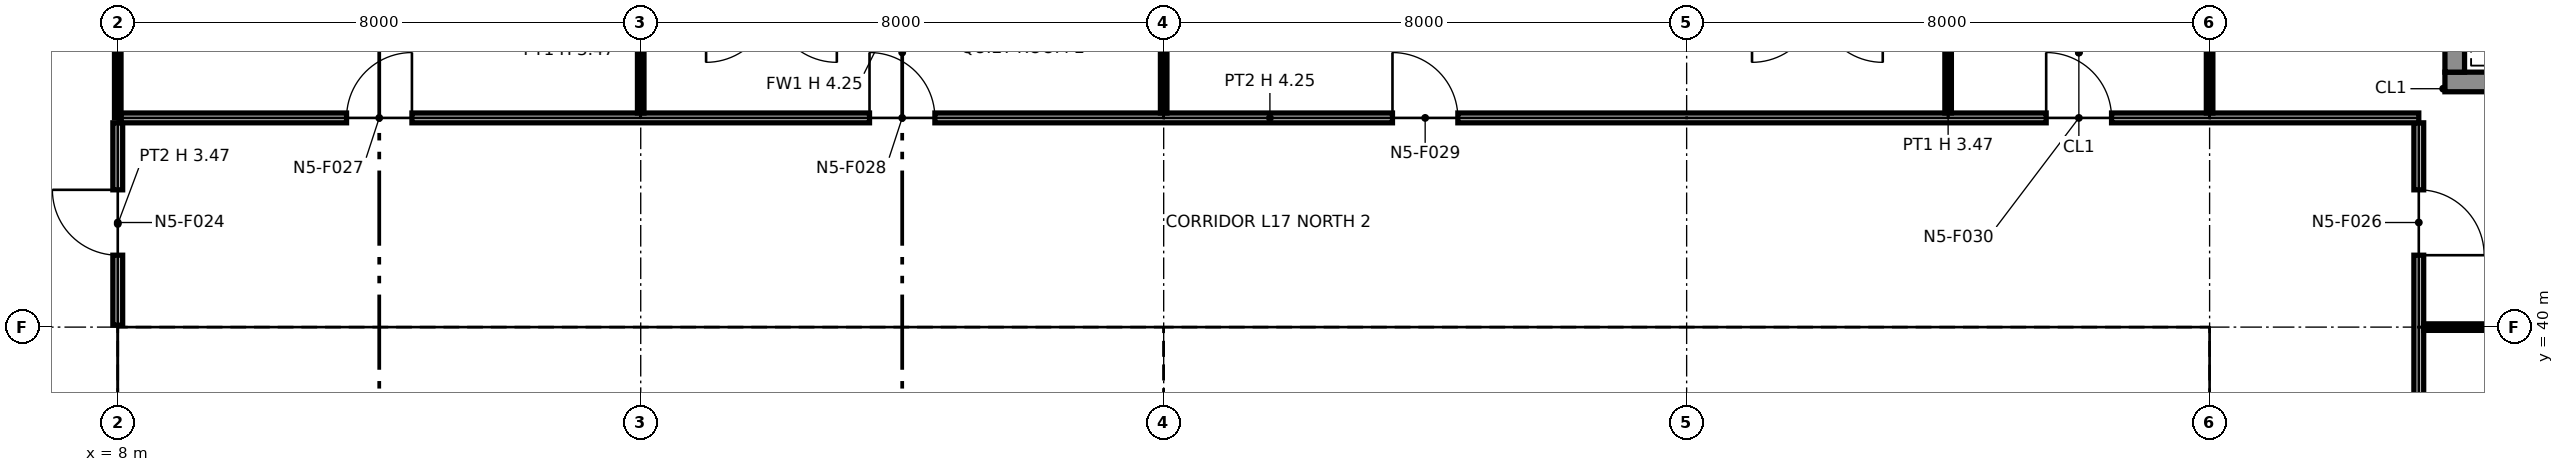
"""IFC4 building model, lengths in metres.
Left out: names, types, materials, properties, quantities, classifications, styles, units other than length and angle.
Written with IfcOpenShell. Run it as: python <this file> out.ifc"""

import sys

from ifc_helpers import new_model, si_unit, direction, frame, frame_2d, origin, origin_2d, place, context, subcontext, project, spatial, polyline, rectangle, i_section, outline, extrude, element, fill, save


model = new_model("IFC4")
c1 = context("Model", 3, precision=1e-05, world=origin(), true_north=direction((0.0, 1.0)))
c2 = subcontext(c1, "Body", "Model", "MODEL_VIEW")
j1 = project(units=[si_unit("LENGTHUNIT", "METRE"), si_unit("PLANEANGLEUNIT", "RADIAN")], contexts=[c1])
p1 = place(None, origin())
s1 = spatial("IfcSite", under=j1, at=p1, CompositionType="ELEMENT")
p2 = place(p1, origin())
s2 = spatial("IfcBuilding", under=s1, at=p2, CompositionType="ELEMENT")
p3 = place(p2, frame((0.0, 0.0, 92.0)))
s3 = spatial("IfcBuildingStorey", under=s2, at=p3, CompositionType="ELEMENT", Elevation=92.0)
for number, where, z_axis, x_axis in (
    (1, (8.0, 40.0, 0.0), (0.0, 0.0, 1.0), (1.0, 0.0, 0.0)),
    (2, (16.0, 40.0, 0.0), (0.0, 0.0, 1.0), (1.0, 0.0, 0.0)),
):
    element("IfcColumn", number, at=place(p3, frame(where, z_axis=z_axis, x_axis=x_axis)), inside=s3, PredefinedType="COLUMN", context=c2, shape_type="SweptSolid", body=[
        extrude(i_section(OverallWidth=0.394, OverallDepth=0.376, WebThickness=0.017, FlangeThickness=0.028, at=origin_2d()), origin(), (0.0, 0.0, 1.0), 4.25),
    ])
p4 = place(p3, frame((24.0, 40.0, 0.0), z_axis=(0.0, 0.0, 1.0), x_axis=(1.0, 0.0, 0.0)))
e3 = element("IfcColumn", 3, at=p4, inside=s3, PredefinedType="COLUMN", context=c2, shape_type="SweptSolid", body=[
    extrude(i_section(OverallWidth=0.399, OverallDepth=0.386, WebThickness=0.021, FlangeThickness=0.033, at=origin_2d()), origin(), (0.0, 0.0, 1.0), 4.25),
])
for number, where, z_axis, x_axis in (
    (4, (32.0, 40.0, 0.0), (0.0, 0.0, 1.0), (1.0, 0.0, 0.0)),
    (5, (40.0, 40.0, 0.0), (0.0, 0.0, 1.0), (1.0, 0.0, 0.0)),
):
    element("IfcColumn", number, at=place(p3, frame(where, z_axis=z_axis, x_axis=x_axis)), inside=s3, PredefinedType="COLUMN", context=c2, shape_type="SweptSolid", body=[
        extrude(i_section(OverallWidth=0.257, OverallDepth=0.363, WebThickness=0.013, FlangeThickness=0.022, at=origin_2d()), origin(), (0.0, 0.0, 1.0), 4.25),
    ])
p5 = place(p3, frame((45.9, 43.75, 0.0), z_axis=(0.0, 0.0, 1.0), x_axis=(-1.0, 0.0, 0.0)))
e6 = element("IfcWall", 6, at=p5, inside=s3, PredefinedType="SOLIDWALL", context=c2, shape_type="SweptSolid", body=[
    extrude(rectangle(XDim=2.3, YDim=0.3, at=frame_2d((1.15, 0.0))), origin(), (0.0, 0.0, 1.0), 4.25),
])
p6 = place(p3, frame((43.75, 43.9, 0.0), z_axis=(0.0, 0.0, 1.0), x_axis=(0.0, 1.0, 0.0)))
e7 = element("IfcWall", 7, at=p6, inside=s3, PredefinedType="SOLIDWALL", context=c2, shape_type="SweptSolid", body=[
    extrude(rectangle(XDim=1.7, YDim=0.3, at=frame_2d((0.85, 0.0))), origin(), (0.0, 0.0, 1.0), 4.25),
])
p7 = place(p3, frame((8.75, 32.85, 0.0), z_axis=(0.0, 0.0, 1.0), x_axis=(0.0, 1.0, 0.0)))
e8 = element("IfcWall", 8, at=p7, inside=s3, PredefinedType="PARTITIONING", context=c2, shape_type="SweptSolid", body=[
    extrude(outline(polyline([(0.0, 0.0), (6.3, 0.0), (6.3, 4.25), (3.231, 4.25), (3.23, 3.789), (3.07, 3.789), (3.069, 4.25), (0.0, 4.25), (0.0, 0.0)])), frame((0.0, 0.1, 0.0), z_axis=(0.0, -1.0, 0.0), x_axis=(1.0, 0.0, 0.0)), (0.0, 0.0, 1.0), 0.2),
])
p8 = place(p3, frame((8.65, 39.25, 0.0), z_axis=(0.0, 0.0, 1.0), x_axis=(1.0, 0.0, 0.0)))
e9 = element("IfcWall", 9, at=p8, inside=s3, PredefinedType="PARTITIONING", context=c2, shape_type="SweptSolid", body=[
    extrude(outline(polyline([(0.0, 0.0), (14.7, 0.0), (14.7, 4.25), (7.469, 4.25), (7.469, 3.632), (7.231, 3.632), (7.23, 4.25), (0.0, 4.25), (0.0, 0.0)])), frame((0.0, 0.1, 0.0), z_axis=(0.0, -1.0, 0.0), x_axis=(1.0, 0.0, 0.0)), (0.0, 0.0, 1.0), 0.2),
])
for number, where, z_axis, x_axis in (
    (10, (10.675, 34.95, 0.0), (0.0, 0.0, 1.0), (0.0, 1.0, 0.0)),
    (11, (12.425, 34.95, 0.0), (0.0, 0.0, 1.0), (0.0, 1.0, 0.0)),
    (12, (14.275, 34.95, 0.0), (0.0, 0.0, 1.0), (0.0, 1.0, 0.0)),
):
    element("IfcWall", number, at=place(p3, frame(where, z_axis=z_axis, x_axis=x_axis)), inside=s3, PredefinedType="PARTITIONING", context=c2, shape_type="SweptSolid", body=[
        extrude(outline(polyline([(0.0, 0.0), (4.2, 0.0), (4.2, 4.25), (1.132, 4.25), (1.131, 3.789), (0.969, 3.789), (0.969, 4.25), (0.0, 4.25), (0.0, 0.0)])), frame((0.0, 0.075, 0.0), z_axis=(0.0, -1.0, 0.0), x_axis=(1.0, 0.0, 0.0)), (0.0, 0.0, 1.0), 0.15),
    ])
p9 = place(p3, frame((16.0, 34.95, 0.0), z_axis=(0.0, 0.0, 1.0), x_axis=(0.0, 1.0, 0.0)))
e13 = element("IfcWall", 13, at=p9, inside=s3, PredefinedType="PARTITIONING", context=c2, shape_type="SweptSolid", body=[
    extrude(rectangle(XDim=4.2, YDim=0.6, at=frame_2d((2.1, 0.0))), origin(), (0.0, 0.0, 1.0), 3.632),
])
for number, where, z_axis, x_axis in (
    (14, (19.2, 32.85, 0.0), (0.0, 0.0, 1.0), (0.0, 1.0, 0.0)),
    (15, (23.25, 32.85, 0.0), (0.0, 0.0, 1.0), (0.0, 1.0, 0.0)),
):
    element("IfcWall", number, at=place(p3, frame(where, z_axis=z_axis, x_axis=x_axis)), inside=s3, PredefinedType="PARTITIONING", context=c2, shape_type="SweptSolid", body=[
        extrude(rectangle(XDim=6.3, YDim=0.2, at=frame_2d((3.15, 0.0))), origin(), (0.0, 0.0, 1.0), 4.25),
    ])
p10 = place(p3, frame((24.75, 32.85, 0.0), z_axis=(0.0, 0.0, 1.0), x_axis=(0.0, 1.0, 0.0)))
e16 = element("IfcWall", 16, at=p10, inside=s3, PredefinedType="PARTITIONING", context=c2, shape_type="SweptSolid", body=[
    extrude(outline(polyline([(0.0, 0.0), (6.3, 0.0), (6.3, 4.25), (3.231, 4.25), (3.23, 3.789), (3.07, 3.789), (3.069, 4.25), (0.0, 4.25), (0.0, 0.0)])), frame((0.0, 0.1, 0.0), z_axis=(0.0, -1.0, 0.0), x_axis=(1.0, 0.0, 0.0)), (0.0, 0.0, 1.0), 0.2),
])
p11 = place(p3, frame((24.65, 39.25, 0.0), z_axis=(0.0, 0.0, 1.0), x_axis=(1.0, 0.0, 0.0)))
e17 = element("IfcWall", 17, at=p11, inside=s3, PredefinedType="PARTITIONING", context=c2, shape_type="SweptSolid", body=[
    extrude(outline(polyline([(0.0, 0.0), (14.7, 0.0), (14.7, 4.25), (7.469, 4.25), (7.469, 3.632), (7.231, 3.632), (7.23, 4.25), (0.0, 4.25), (0.0, 0.0)])), frame((0.0, 0.1, 0.0), z_axis=(0.0, -1.0, 0.0), x_axis=(1.0, 0.0, 0.0)), (0.0, 0.0, 1.0), 0.2),
])
for number, where, z_axis, x_axis in (
    (18, (27.2, 36.4, 0.0), (0.0, 0.0, 1.0), (0.0, 1.0, 0.0)),
    (19, (29.5, 36.4, 0.0), (0.0, 0.0, 1.0), (0.0, 1.0, 0.0)),
):
    element("IfcWall", number, at=place(p3, frame(where, z_axis=z_axis, x_axis=x_axis)), inside=s3, PredefinedType="PARTITIONING", context=c2, shape_type="SweptSolid", body=[
        extrude(rectangle(XDim=2.75, YDim=0.2, at=frame_2d((1.375, 0.0))), origin(), (0.0, 0.0, 1.0), 4.25),
    ])
p12 = place(p3, frame((32.0, 32.85, 0.0), z_axis=(0.0, 0.0, 1.0), x_axis=(0.0, 1.0, 0.0)))
e20 = element("IfcWall", 20, at=p12, inside=s3, PredefinedType="PARTITIONING", context=c2, shape_type="SweptSolid", body=[
    extrude(rectangle(XDim=6.3, YDim=0.6, at=frame_2d((3.15, 0.0))), origin(), (0.0, 0.0, 1.0), 3.632),
])
for number, where, z_axis, x_axis in (
    (21, (35.6, 32.85, 0.0), (0.0, 0.0, 1.0), (0.0, 1.0, 0.0)),
    (22, (39.25, 32.85, 0.0), (0.0, 0.0, 1.0), (0.0, 1.0, 0.0)),
):
    element("IfcWall", number, at=place(p3, frame(where, z_axis=z_axis, x_axis=x_axis)), inside=s3, PredefinedType="PARTITIONING", context=c2, shape_type="SweptSolid", body=[
        extrude(rectangle(XDim=6.3, YDim=0.2, at=frame_2d((3.15, 0.0))), origin(), (0.0, 0.0, 1.0), 4.25),
    ])
p13 = place(p3, frame((43.2, 16.0, 0.0), z_axis=(0.0, 0.0, 1.0), x_axis=(0.0, 1.0, 0.0)))
e23 = element("IfcWall", 23, at=p13, inside=s3, PredefinedType="PARTITIONING", context=c2, shape_type="SweptSolid", body=[
    extrude(outline(polyline([(0.0, 0.0), (27.125, 0.0), (27.125, 4.25), (24.3, 4.25), (24.298, 3.47), (23.702, 3.47), (23.7, 4.25), (20.3, 4.25), (20.298, 3.47), (19.702, 3.47), (19.7, 4.25), (16.3, 4.25), (16.298, 3.47), (15.702, 3.47), (15.7, 4.25), (12.3, 4.25), (12.298, 3.47), (11.702, 3.47), (11.7, 4.25), (8.3, 4.25), (8.298, 3.47), (7.702, 3.47), (7.7, 4.25), (4.3, 4.25), (4.298, 3.47), (3.702, 3.47), (3.7, 4.25), (0.0, 4.25), (0.0, 0.0)])), frame((0.0, 0.075, 0.0), z_axis=(0.0, -1.0, 0.0), x_axis=(1.0, 0.0, 0.0)), (0.0, 0.0, 1.0), 0.15),
])
p14 = place(p13, frame((2.5, 0.0, 0.0), z_axis=(0.0, 0.0, 1.0), x_axis=(-1.0, 0.0, 0.0)))
e24 = element("IfcOpeningElement", 24, at=p14, cuts=e23, PredefinedType="OPENING", context=c2, shape_type="SweptSolid", body=[
    extrude(rectangle(XDim=1.0, YDim=2.1, at=frame_2d((0.5, 1.05))), frame((0.0, 0.085, 0.0), z_axis=(0.0, -1.0, 0.0), x_axis=(1.0, 0.0, 0.0)), (0.0, 0.0, 1.0), 0.17),
])
p15 = place(p13, frame((12.5, 0.0, 0.0), z_axis=(0.0, 0.0, 1.0), x_axis=(-1.0, 0.0, 0.0)))
e25 = element("IfcOpeningElement", 25, at=p15, cuts=e23, PredefinedType="OPENING", context=c2, shape_type="SweptSolid", body=[
    extrude(rectangle(XDim=1.0, YDim=2.1, at=frame_2d((0.5, 1.05))), frame((0.0, 0.085, 0.0), z_axis=(0.0, -1.0, 0.0), x_axis=(1.0, 0.0, 0.0)), (0.0, 0.0, 1.0), 0.17),
])
p16 = place(p13, frame((18.5, 0.0, 0.0), z_axis=(0.0, 0.0, 1.0), x_axis=(-1.0, 0.0, 0.0)))
e26 = element("IfcOpeningElement", 26, at=p16, cuts=e23, PredefinedType="OPENING", context=c2, shape_type="SweptSolid", body=[
    extrude(rectangle(XDim=1.0, YDim=2.1, at=frame_2d((0.5, 1.05))), frame((0.0, 0.085, 0.0), z_axis=(0.0, -1.0, 0.0), x_axis=(1.0, 0.0, 0.0)), (0.0, 0.0, 1.0), 0.17),
])
p17 = place(p13, frame((22.5, 0.0, 0.0), z_axis=(0.0, 0.0, 1.0), x_axis=(-1.0, 0.0, 0.0)))
e27 = element("IfcOpeningElement", 27, at=p17, cuts=e23, PredefinedType="OPENING", context=c2, shape_type="SweptSolid", body=[
    extrude(rectangle(XDim=1.0, YDim=2.1, at=frame_2d((0.5, 1.05))), frame((0.0, 0.085, 0.0), z_axis=(0.0, -1.0, 0.0), x_axis=(1.0, 0.0, 0.0)), (0.0, 0.0, 1.0), 0.17),
])
p18 = place(p13, frame((26.1, 0.0, 0.0), z_axis=(0.0, 0.0, 1.0), x_axis=(-1.0, 0.0, 0.0)))
e28 = element("IfcOpeningElement", 28, at=p18, cuts=e23, PredefinedType="OPENING", context=c2, shape_type="SweptSolid", body=[
    extrude(rectangle(XDim=1.0, YDim=2.1, at=frame_2d((0.5, 1.05))), frame((0.0, 0.085, 0.0), z_axis=(0.0, -1.0, 0.0), x_axis=(1.0, 0.0, 0.0)), (0.0, 0.0, 1.0), 0.17),
])
p19 = place(p3, frame((43.275, 40.0, 0.0), z_axis=(0.0, 0.0, 1.0), x_axis=(1.0, 0.0, 0.0)))
e29 = element("IfcWall", 29, at=p19, inside=s3, PredefinedType="PARTITIONING", context=c2, shape_type="SweptSolid", body=[
    extrude(rectangle(XDim=4.595, YDim=0.1, at=frame_2d((2.298, 0.0))), origin(), (0.0, 0.0, 1.0), 3.47),
])
p20 = place(p3, frame((8.0, 40.03, 0.0), z_axis=(0.0, 0.0, 1.0), x_axis=(0.0, 1.0, 0.0)))
e30 = element("IfcWall", 30, at=p20, inside=s3, PredefinedType="PARTITIONING", context=c2, shape_type="SweptSolid", body=[
    extrude(rectangle(XDim=3.095, YDim=0.15, at=frame_2d((1.547, 0.0))), origin(), (0.0, 0.0, 1.0), 3.47),
])
p21 = place(p20, frame((1.07, 0.0, 0.0)))
e31 = element("IfcOpeningElement", 31, at=p21, cuts=e30, PredefinedType="OPENING", context=c2, shape_type="SweptSolid", body=[
    extrude(rectangle(XDim=1.0, YDim=2.1, at=frame_2d((0.5, 1.05))), frame((0.0, 0.085, 0.0), z_axis=(0.0, -1.0, 0.0), x_axis=(1.0, 0.0, 0.0)), (0.0, 0.0, 1.0), 0.17),
])
p22 = place(p3, frame((8.05, 43.2, 0.0), z_axis=(0.0, 0.0, 1.0), x_axis=(1.0, 0.0, 0.0)))
e32 = element("IfcWall", 32, at=p22, inside=s3, PredefinedType="PARTITIONING", context=c2, shape_type="SweptSolid", body=[
    extrude(rectangle(XDim=35.15, YDim=0.15, at=frame_2d((17.575, 0.0))), origin(), (0.0, 0.0, 1.0), 4.25),
])
p23 = place(p22, frame((3.45, 0.0, 0.0)))
e33 = element("IfcOpeningElement", 33, at=p23, cuts=e32, PredefinedType="OPENING", context=c2, shape_type="SweptSolid", body=[
    extrude(rectangle(XDim=1.0, YDim=2.1, at=frame_2d((0.5, 1.05))), frame((0.0, 0.085, 0.0), z_axis=(0.0, -1.0, 0.0), x_axis=(1.0, 0.0, 0.0)), (0.0, 0.0, 1.0), 0.17),
])
p24 = place(p22, frame((11.45, 0.0, 0.0)))
e34 = element("IfcOpeningElement", 34, at=p24, cuts=e32, PredefinedType="OPENING", context=c2, shape_type="SweptSolid", body=[
    extrude(rectangle(XDim=1.0, YDim=2.1, at=frame_2d((0.5, 1.05))), frame((0.0, 0.085, 0.0), z_axis=(0.0, -1.0, 0.0), x_axis=(1.0, 0.0, 0.0)), (0.0, 0.0, 1.0), 0.17),
])
p25 = place(p22, frame((19.45, 0.0, 0.0)))
e35 = element("IfcOpeningElement", 35, at=p25, cuts=e32, PredefinedType="OPENING", context=c2, shape_type="SweptSolid", body=[
    extrude(rectangle(XDim=1.0, YDim=2.1, at=frame_2d((0.5, 1.05))), frame((0.0, 0.085, 0.0), z_axis=(0.0, -1.0, 0.0), x_axis=(1.0, 0.0, 0.0)), (0.0, 0.0, 1.0), 0.17),
])
p26 = place(p22, frame((29.45, 0.0, 0.0)))
e36 = element("IfcOpeningElement", 36, at=p26, cuts=e32, PredefinedType="OPENING", context=c2, shape_type="SweptSolid", body=[
    extrude(rectangle(XDim=1.0, YDim=2.1, at=frame_2d((0.5, 1.05))), frame((0.0, 0.085, 0.0), z_axis=(0.0, -1.0, 0.0), x_axis=(1.0, 0.0, 0.0)), (0.0, 0.0, 1.0), 0.17),
])
p27 = place(p3, frame((8.0, 43.2, 0.0), z_axis=(0.0, 0.0, 1.0), x_axis=(0.0, 1.0, 0.0)))
e37 = element("IfcWall", 37, at=p27, inside=s3, PredefinedType="PARTITIONING", context=c2, shape_type="SweptSolid", body=[
    extrude(rectangle(XDim=4.67, YDim=0.1, at=frame_2d((2.335, 0.0))), origin(), (0.0, 0.0, 1.0), 3.47),
])
for number, where, z_axis, x_axis in (
    (38, (16.0, 43.275, 0.0), (0.0, 0.0, 1.0), (0.0, 1.0, 0.0)),
    (39, (24.0, 43.275, 0.0), (0.0, 0.0, 1.0), (0.0, 1.0, 0.0)),
    (40, (36.0, 43.275, 0.0), (0.0, 0.0, 1.0), (0.0, 1.0, 0.0)),
    (41, (40.0, 43.275, 0.0), (0.0, 0.0, 1.0), (0.0, 1.0, 0.0)),
):
    element("IfcWall", number, at=place(p3, frame(where, z_axis=z_axis, x_axis=x_axis)), inside=s3, PredefinedType="PARTITIONING", context=c2, shape_type="SweptSolid", body=[
        extrude(rectangle(XDim=1.895, YDim=0.1, at=frame_2d((0.948, 0.0))), origin(), (0.0, 0.0, 1.0), 3.47),
    ])
p28 = place(p21, origin())
e42 = element("IfcDoor", 42, at=p28, inside=s3, OperationType="SINGLE_SWING_RIGHT", PredefinedType="DOOR", context=c2, shape_type="SweptSolid", body=[
    extrude(rectangle(XDim=1.0, YDim=2.1, at=frame_2d((0.5, 1.05))), frame((0.0, 0.025, 0.0), z_axis=(0.0, -1.0, 0.0), x_axis=(1.0, 0.0, 0.0)), (0.0, 0.0, 1.0), 0.05),
])
fill(e31, e42)
p29 = place(p18, origin())
e43 = element("IfcDoor", 43, at=p29, inside=s3, OperationType="SINGLE_SWING_RIGHT", PredefinedType="DOOR", context=c2, shape_type="SweptSolid", body=[
    extrude(rectangle(XDim=1.0, YDim=2.1, at=frame_2d((0.5, 1.05))), frame((0.0, 0.025, 0.0), z_axis=(0.0, -1.0, 0.0), x_axis=(1.0, 0.0, 0.0)), (0.0, 0.0, 1.0), 0.05),
])
fill(e28, e43)
p30 = place(p23, origin())
e44 = element("IfcDoor", 44, at=p30, inside=s3, OperationType="SINGLE_SWING_RIGHT", PredefinedType="DOOR", context=c2, shape_type="SweptSolid", body=[
    extrude(rectangle(XDim=1.0, YDim=2.1, at=frame_2d((0.5, 1.05))), frame((0.0, 0.025, 0.0), z_axis=(0.0, -1.0, 0.0), x_axis=(1.0, 0.0, 0.0)), (0.0, 0.0, 1.0), 0.05),
])
fill(e33, e44)
p31 = place(p24, origin())
e45 = element("IfcDoor", 45, at=p31, inside=s3, OperationType="SINGLE_SWING_LEFT", PredefinedType="DOOR", context=c2, shape_type="SweptSolid", body=[
    extrude(rectangle(XDim=1.0, YDim=2.1, at=frame_2d((0.5, 1.05))), frame((0.0, 0.025, 0.0), z_axis=(0.0, -1.0, 0.0), x_axis=(1.0, 0.0, 0.0)), (0.0, 0.0, 1.0), 0.05),
])
fill(e34, e45)
p32 = place(p25, origin())
e46 = element("IfcDoor", 46, at=p32, inside=s3, OperationType="SINGLE_SWING_LEFT", PredefinedType="DOOR", context=c2, shape_type="SweptSolid", body=[
    extrude(rectangle(XDim=1.0, YDim=2.1, at=frame_2d((0.5, 1.05))), frame((0.0, 0.025, 0.0), z_axis=(0.0, -1.0, 0.0), x_axis=(1.0, 0.0, 0.0)), (0.0, 0.0, 1.0), 0.05),
])
fill(e35, e46)
p33 = place(p26, origin())
e47 = element("IfcDoor", 47, at=p33, inside=s3, OperationType="SINGLE_SWING_LEFT", PredefinedType="DOOR", context=c2, shape_type="SweptSolid", body=[
    extrude(rectangle(XDim=1.0, YDim=2.1, at=frame_2d((0.5, 1.05))), frame((0.0, 0.025, 0.0), z_axis=(0.0, -1.0, 0.0), x_axis=(1.0, 0.0, 0.0)), (0.0, 0.0, 1.0), 0.05),
])
fill(e36, e47)
save(model, sys.argv[1])
